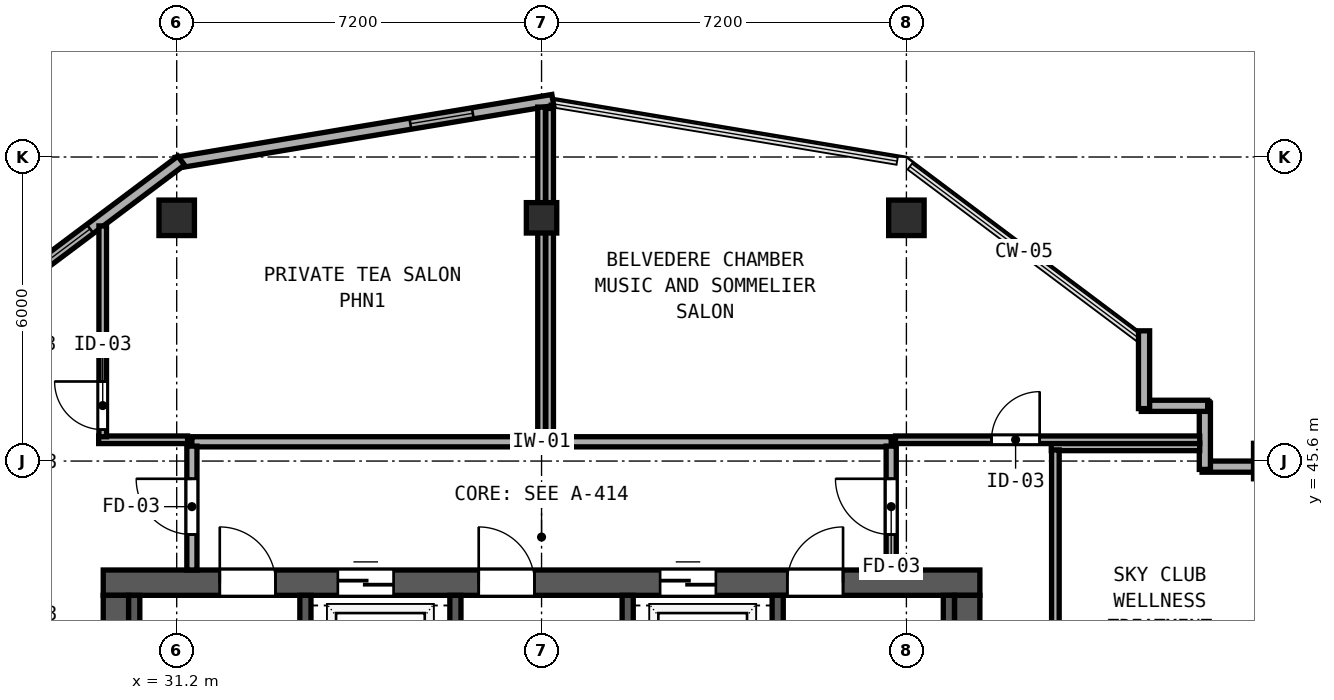
"""IFC4 building model, lengths in metres.
Left out: names, types, materials, properties, quantities, classifications, styles, units other than length and angle.
Written with IfcOpenShell. Run it as: python <this file> out.ifc"""

import sys

from ifc_helpers import new_model, si_unit, direction, frame, frame_2d, origin, origin_2d, place, context, subcontext, project, spatial, rectangle, hollow_rectangle, extrude, element, fill, save


model = new_model("IFC4")
c1 = context("Model", 3, precision=1e-05, world=origin(), true_north=direction((0.0, 1.0)))
c2 = subcontext(c1, "Body", "Model", "MODEL_VIEW")
j1 = project(units=[si_unit("LENGTHUNIT", "METRE"), si_unit("PLANEANGLEUNIT", "RADIAN")], contexts=[c1])
p1 = place(None, origin())
s1 = spatial("IfcSite", under=j1, at=p1, CompositionType="ELEMENT")
p2 = place(p1, origin())
s2 = spatial("IfcBuilding", under=s1, at=p2, CompositionType="ELEMENT")
p3 = place(p2, frame((0.0, 0.0, 305.6)))
s3 = spatial("IfcBuildingStorey", under=s2, at=p3, CompositionType="ELEMENT", Elevation=305.6)
p4 = place(p3, frame((29.75, 43.2, 0.0), z_axis=(0.0, 0.0, 1.0), x_axis=(1.0, 0.0, 0.0)))
e1 = element("IfcWall", 1, at=p4, inside=s3, PredefinedType="SHEAR", context=c2, shape_type="SweptSolid", body=[
    extrude(rectangle(XDim=17.3, YDim=0.5, at=frame_2d((8.65, 0.0))), origin(), (0.0, 0.0, 1.0), 3.72),
])
p5 = place(p4, frame((2.3, 0.0, 0.0)))
e2 = element("IfcOpeningElement", 2, at=p5, cuts=e1, PredefinedType="OPENING", context=c2, shape_type="SweptSolid", body=[
    extrude(rectangle(XDim=1.1, YDim=2.15, at=frame_2d((0.55, 1.075))), frame((0.0, 0.26, 0.0), z_axis=(0.0, -1.0, 0.0), x_axis=(1.0, 0.0, 0.0)), (0.0, 0.0, 1.0), 0.52),
])
p6 = place(p4, frame((7.41, 0.0, 0.0)))
e3 = element("IfcOpeningElement", 3, at=p6, cuts=e1, PredefinedType="OPENING", context=c2, shape_type="SweptSolid", body=[
    extrude(rectangle(XDim=1.1, YDim=2.15, at=frame_2d((0.55, 1.075))), frame((0.0, 0.26, 0.0), z_axis=(0.0, -1.0, 0.0), x_axis=(1.0, 0.0, 0.0)), (0.0, 0.0, 1.0), 0.52),
])
p7 = place(p4, frame((13.5, 0.0, 0.0)))
e4 = element("IfcOpeningElement", 4, at=p7, cuts=e1, PredefinedType="OPENING", context=c2, shape_type="SweptSolid", body=[
    extrude(rectangle(XDim=1.1, YDim=2.15, at=frame_2d((0.55, 1.075))), frame((0.0, 0.26, 0.0), z_axis=(0.0, -1.0, 0.0), x_axis=(1.0, 0.0, 0.0)), (0.0, 0.0, 1.0), 0.52),
])
p8 = place(p4, frame((4.63, 0.0, 0.0)))
e5 = element("IfcOpeningElement", 5, at=p8, cuts=e1, PredefinedType="OPENING", context=c2, shape_type="SweptSolid", body=[
    extrude(rectangle(XDim=1.1, YDim=2.2, at=frame_2d((0.55, 1.1))), frame((0.0, 0.26, 0.0), z_axis=(0.0, -1.0, 0.0), x_axis=(1.0, 0.0, 0.0)), (0.0, 0.0, 1.0), 0.52),
])
p9 = place(p4, frame((10.99, 0.0, 0.0)))
e6 = element("IfcOpeningElement", 6, at=p9, cuts=e1, PredefinedType="OPENING", context=c2, shape_type="SweptSolid", body=[
    extrude(rectangle(XDim=1.1, YDim=2.2, at=frame_2d((0.55, 1.1))), frame((0.0, 0.26, 0.0), z_axis=(0.0, -1.0, 0.0), x_axis=(1.0, 0.0, 0.0)), (0.0, 0.0, 1.0), 0.52),
])
for number, where, z_axis, x_axis in (
    (7, (30.0, 32.8, 0.0), (0.0, 0.0, 1.0), (0.0, 1.0, 0.0)),
    (8, (46.8, 32.8, 0.0), (0.0, 0.0, 1.0), (0.0, 1.0, 0.0)),
):
    element("IfcWall", number, at=place(p3, frame(where, z_axis=z_axis, x_axis=x_axis)), inside=s3, PredefinedType="SHEAR", context=c2, shape_type="SweptSolid", body=[
        extrude(rectangle(XDim=10.15, YDim=0.5, at=frame_2d((5.075, 0.0))), origin(), (0.0, 0.0, 1.0), 3.72),
    ])
for number, where, z_axis, x_axis in (
    (9, (30.362, 35.39, 0.0), (0.0, 0.0, 1.0), (0.0, 1.0, 0.0)),
    (10, (33.74, 35.39, 0.0), (0.0, 0.0, 1.0), (0.0, 1.0, 0.0)),
    (11, (36.7, 35.39, 0.0), (0.0, 0.0, 1.0), (0.0, 1.0, 0.0)),
    (12, (40.1, 35.39, 0.0), (0.0, 0.0, 1.0), (0.0, 1.0, 0.0)),
    (13, (43.06, 35.39, 0.0), (0.0, 0.0, 1.0), (0.0, 1.0, 0.0)),
    (14, (46.438, 35.39, 0.0), (0.0, 0.0, 1.0), (0.0, 1.0, 0.0)),
):
    element("IfcWall", number, at=place(p3, frame(where, z_axis=z_axis, x_axis=x_axis)), inside=s3, PredefinedType="SHEAR", context=c2, shape_type="SweptSolid", body=[
        extrude(rectangle(XDim=7.56, YDim=0.22, at=frame_2d((3.78, 0.0))), origin(), (0.0, 0.0, 1.0), 3.72),
    ])
for number, where, z_axis, x_axis in (
    (15, (52.8, 45.6, 0.0), (0.0, 0.0, 1.0), (1.0, 0.0, 0.0)),
    (16, (31.2, 50.4, 0.0), (0.0, 0.0, 1.0), (1.0, 0.0, 0.0)),
    (17, (45.6, 50.4, 0.0), (0.0, 0.0, 1.0), (1.0, 0.0, 0.0)),
):
    element("IfcColumn", number, at=place(p3, frame(where, z_axis=z_axis, x_axis=x_axis)), inside=s3, PredefinedType="COLUMN", context=c2, shape_type="SweptSolid", body=[
        extrude(hollow_rectangle(XDim=0.7, YDim=0.7, WallThickness=0.026, at=origin_2d()), origin(), (0.0, 0.0, 1.0), 3.9),
    ])
p10 = place(p3, frame((38.4, 50.4, 0.0), z_axis=(0.0, 0.0, 1.0), x_axis=(1.0, 0.0, 0.0)))
e18 = element("IfcColumn", 18, at=p10, inside=s3, PredefinedType="COLUMN", context=c2, shape_type="SweptSolid", body=[
    extrude(hollow_rectangle(XDim=0.6, YDim=0.6, WallThickness=0.024, at=origin_2d()), origin(), (0.0, 0.0, 1.0), 3.9),
])
p11 = place(p3, frame((52.458, 45.49, 0.0), z_axis=(0.0, 0.0, 1.0), x_axis=(-1.0, 0.0, 0.0)))
e19 = element("IfcWall", 19, at=p11, inside=s3, PredefinedType="SOLIDWALL", context=c2, shape_type="SweptSolid", body=[
    extrude(rectangle(XDim=1.023, YDim=0.22, at=frame_2d((0.511, 0.0))), origin(), (0.0, 0.0, 1.0), 3.72),
])
p12 = place(p3, frame((51.49, 45.435, 0.0), z_axis=(0.0, 0.0, 1.0), x_axis=(0.0, 1.0, 0.0)))
e20 = element("IfcWall", 20, at=p12, inside=s3, PredefinedType="SOLIDWALL", context=c2, shape_type="SweptSolid", body=[
    extrude(rectangle(XDim=1.31, YDim=0.22, at=frame_2d((0.655, 0.0))), origin(), (0.0, 0.0, 1.0), 3.72),
])
p13 = place(p3, frame((51.545, 46.69, 0.0), z_axis=(0.0, 0.0, 1.0), x_axis=(-1.0, 0.0, 0.0)))
e21 = element("IfcWall", 21, at=p13, inside=s3, PredefinedType="SOLIDWALL", context=c2, shape_type="SweptSolid", body=[
    extrude(rectangle(XDim=1.31, YDim=0.22, at=frame_2d((0.655, 0.0))), origin(), (0.0, 0.0, 1.0), 3.72),
])
p14 = place(p3, frame((50.29, 46.635, 0.0), z_axis=(0.0, 0.0, 1.0), x_axis=(0.0, 1.0, 0.0)))
e22 = element("IfcWall", 22, at=p14, inside=s3, PredefinedType="SOLIDWALL", context=c2, shape_type="SweptSolid", body=[
    extrude(rectangle(XDim=1.535, YDim=0.22, at=frame_2d((0.768, 0.0))), origin(), (0.0, 0.0, 1.0), 3.72),
])
p15 = place(p3, frame((38.622, 52.726, 0.0), z_axis=(0.0, 0.0, 1.0), x_axis=(-0.986390420428, -0.164420006349, 0.0)))
e23 = element("IfcWall", 23, at=p15, inside=s3, PredefinedType="SOLIDWALL", context=c2, shape_type="SweptSolid", body=[
    extrude(rectangle(XDim=7.534, YDim=0.22, at=frame_2d((3.767, 0.0))), origin(), (0.0, 0.0, 1.0), 3.72),
])
p16 = place(p15, frame((1.6, 0.0, 0.85)))
e24 = element("IfcOpeningElement", 24, at=p16, cuts=e23, PredefinedType="OPENING", context=c2, shape_type="SweptSolid", body=[
    extrude(rectangle(XDim=1.25, YDim=1.95, at=frame_2d((0.625, 0.975))), frame((0.0, 0.12, 0.0), z_axis=(0.0, -1.0, 0.0), x_axis=(1.0, 0.0, 0.0)), (0.0, 0.0, 1.0), 0.24),
])
p17 = place(p3, frame((31.289, 51.529, 0.0), z_axis=(0.0, 0.0, 1.0), x_axis=(-0.800014580093, -0.599980559383, 0.0)))
e25 = element("IfcWall", 25, at=p17, inside=s3, PredefinedType="SOLIDWALL", context=c2, shape_type="SweptSolid", body=[
    extrude(rectangle(XDim=6.028, YDim=0.22, at=frame_2d((3.014, 0.0))), origin(), (0.0, 0.0, 1.0), 3.72),
])
p18 = place(p17, frame((2.247, 0.0, 0.85)))
e26 = element("IfcOpeningElement", 26, at=p18, cuts=e25, PredefinedType="OPENING", context=c2, shape_type="SweptSolid", body=[
    extrude(rectangle(XDim=1.25, YDim=1.95, at=frame_2d((0.625, 0.975))), frame((0.0, 0.12, 0.0), z_axis=(0.0, -1.0, 0.0), x_axis=(1.0, 0.0, 0.0)), (0.0, 0.0, 1.0), 0.24),
])
p19 = place(p3, frame((31.5, 45.98, 0.0), z_axis=(0.0, 0.0, 1.0), x_axis=(1.0, 0.0, 0.0)))
e27 = element("IfcWall", 27, at=p19, inside=s3, PredefinedType="SOLIDWALL", context=c2, shape_type="SweptSolid", body=[
    extrude(rectangle(XDim=13.8, YDim=0.2, at=frame_2d((6.9, 0.0))), origin(), (0.0, 0.0, 1.0), 3.72),
])
p20 = place(p3, frame((31.5, 43.45, 0.0), z_axis=(0.0, 0.0, 1.0), x_axis=(0.0, 1.0, 0.0)))
e28 = element("IfcWall", 28, at=p20, inside=s3, PredefinedType="SOLIDWALL", context=c2, shape_type="SweptSolid", body=[
    extrude(rectangle(XDim=2.445, YDim=0.2, at=frame_2d((1.223, 0.0))), origin(), (0.0, 0.0, 1.0), 3.72),
])
p21 = place(p20, frame((1.8, 0.0, 0.0), z_axis=(0.0, 0.0, 1.0), x_axis=(-1.0, 0.0, 0.0)))
e29 = element("IfcOpeningElement", 29, at=p21, cuts=e28, PredefinedType="OPENING", context=c2, shape_type="SweptSolid", body=[
    extrude(rectangle(XDim=1.1, YDim=2.15, at=frame_2d((0.55, 1.075))), frame((0.0, 0.11, 0.0), z_axis=(0.0, -1.0, 0.0), x_axis=(1.0, 0.0, 0.0)), (0.0, 0.0, 1.0), 0.22),
])
p22 = place(p3, frame((45.3, 43.45, 0.0), z_axis=(0.0, 0.0, 1.0), x_axis=(0.0, 1.0, 0.0)))
e30 = element("IfcWall", 30, at=p22, inside=s3, PredefinedType="SOLIDWALL", context=c2, shape_type="SweptSolid", body=[
    extrude(rectangle(XDim=2.445, YDim=0.2, at=frame_2d((1.223, 0.0))), origin(), (0.0, 0.0, 1.0), 3.72),
])
p23 = place(p22, frame((0.7, 0.0, 0.0)))
e31 = element("IfcOpeningElement", 31, at=p23, cuts=e30, PredefinedType="OPENING", context=c2, shape_type="SweptSolid", body=[
    extrude(rectangle(XDim=1.1, YDim=2.15, at=frame_2d((0.55, 1.075))), frame((0.0, 0.11, 0.0), z_axis=(0.0, -1.0, 0.0), x_axis=(1.0, 0.0, 0.0)), (0.0, 0.0, 1.0), 0.22),
])
p24 = place(p3, frame((48.46, 45.88, 0.0), z_axis=(0.0, 0.0, 1.0), x_axis=(1.0, 0.0, 0.0)))
e32 = element("IfcWall", 32, at=p24, inside=s3, PredefinedType="PARTITIONING", context=c2, shape_type="SweptSolid", body=[
    extrude(rectangle(XDim=2.928, YDim=0.15, at=frame_2d((1.464, 0.0))), origin(), (0.0, 0.0, 1.0), 3.72),
])
p25 = place(p3, frame((48.54, 37.42, 0.0), z_axis=(0.0, 0.0, 1.0), x_axis=(0.0, 1.0, 0.0)))
e33 = element("IfcWall", 33, at=p25, inside=s3, PredefinedType="PARTITIONING", context=c2, shape_type="SweptSolid", body=[
    extrude(rectangle(XDim=8.4, YDim=0.15, at=frame_2d((4.2, 0.0))), origin(), (0.0, 0.0, 1.0), 3.72),
])
p26 = place(p25, frame((2.06, 0.0, 0.0)))
e34 = element("IfcOpeningElement", 34, at=p26, cuts=e33, PredefinedType="OPENING", context=c2, shape_type="SweptSolid", body=[
    extrude(rectangle(XDim=0.95, YDim=2.12, at=frame_2d((0.475, 1.06))), frame((0.0, 0.085, 0.0), z_axis=(0.0, -1.0, 0.0), x_axis=(1.0, 0.0, 0.0)), (0.0, 0.0, 1.0), 0.17),
])
p27 = place(p3, frame((29.66, 46.02, 0.0), z_axis=(0.0, 0.0, 1.0), x_axis=(1.0, 0.0, 0.0)))
e35 = element("IfcWall", 35, at=p27, inside=s3, PredefinedType="PARTITIONING", context=c2, shape_type="SweptSolid", body=[
    extrude(rectangle(XDim=1.755, YDim=0.15, at=frame_2d((0.877, 0.0))), origin(), (0.0, 0.0, 1.0), 3.72),
])
p28 = place(p3, frame((29.74, 46.08, 0.0), z_axis=(0.0, 0.0, 1.0), x_axis=(0.0, 1.0, 0.0)))
e36 = element("IfcWall", 36, at=p28, inside=s3, PredefinedType="PARTITIONING", context=c2, shape_type="SweptSolid", body=[
    extrude(rectangle(XDim=4.16, YDim=0.15, at=frame_2d((2.08, 0.0))), origin(), (0.0, 0.0, 1.0), 3.72),
])
p29 = place(p28, frame((0.14, 0.0, 0.0)))
e37 = element("IfcOpeningElement", 37, at=p29, cuts=e36, PredefinedType="OPENING", context=c2, shape_type="SweptSolid", body=[
    extrude(rectangle(XDim=0.95, YDim=2.12, at=frame_2d((0.475, 1.06))), frame((0.0, 0.085, 0.0), z_axis=(0.0, -1.0, 0.0), x_axis=(1.0, 0.0, 0.0)), (0.0, 0.0, 1.0), 0.17),
])
p30 = place(p3, frame((38.4, 46.065, 0.0), z_axis=(0.0, 0.0, 1.0), x_axis=(0.0, 1.0, 0.0)))
e38 = element("IfcWall", 38, at=p30, inside=s3, PredefinedType="PARTITIONING", context=c2, shape_type="SweptSolid", body=[
    extrude(rectangle(XDim=6.52, YDim=0.15, at=frame_2d((3.26, 0.0))), origin(), (0.0, 0.0, 1.0), 3.72),
])
p31 = place(p3, frame((45.385, 46.02, 0.0), z_axis=(0.0, 0.0, 1.0), x_axis=(1.0, 0.0, 0.0)))
e39 = element("IfcWall", 39, at=p31, inside=s3, PredefinedType="PARTITIONING", context=c2, shape_type="SweptSolid", body=[
    extrude(rectangle(XDim=6.003, YDim=0.15, at=frame_2d((3.001, 0.0))), origin(), (0.0, 0.0, 1.0), 3.72),
])
p32 = place(p31, frame((1.895, 0.0, 0.0)))
e40 = element("IfcOpeningElement", 40, at=p32, cuts=e39, PredefinedType="OPENING", context=c2, shape_type="SweptSolid", body=[
    extrude(rectangle(XDim=0.95, YDim=2.12, at=frame_2d((0.475, 1.06))), frame((0.0, 0.085, 0.0), z_axis=(0.0, -1.0, 0.0), x_axis=(1.0, 0.0, 0.0)), (0.0, 0.0, 1.0), 0.17),
])
p33 = place(p3, frame((38.56, 46.065, 0.0), z_axis=(0.0, 0.0, 1.0), x_axis=(0.0, 1.0, 0.0)))
e41 = element("IfcWall", 41, at=p33, inside=s3, PredefinedType="PARTITIONING", context=c2, shape_type="SweptSolid", body=[
    extrude(rectangle(XDim=6.493, YDim=0.15, at=frame_2d((3.247, 0.0))), origin(), (0.0, 0.0, 1.0), 3.72),
])
p34 = place(p16, origin())
e42 = element("IfcWindow", 42, at=p34, inside=s3, PartitioningType="SINGLE_PANEL", PredefinedType="WINDOW", context=c2, shape_type="SweptSolid", body=[
    extrude(rectangle(XDim=1.25, YDim=1.95, at=frame_2d((0.625, 0.975))), frame((0.0, 0.03, 0.0), z_axis=(0.0, -1.0, 0.0), x_axis=(1.0, 0.0, 0.0)), (0.0, 0.0, 1.0), 0.06),
])
fill(e24, e42)
p35 = place(p18, origin())
e43 = element("IfcWindow", 43, at=p35, inside=s3, PartitioningType="SINGLE_PANEL", PredefinedType="WINDOW", context=c2, shape_type="SweptSolid", body=[
    extrude(rectangle(XDim=1.25, YDim=1.95, at=frame_2d((0.625, 0.975))), frame((0.0, 0.03, 0.0), z_axis=(0.0, -1.0, 0.0), x_axis=(1.0, 0.0, 0.0)), (0.0, 0.0, 1.0), 0.06),
])
fill(e26, e43)
p36 = place(p5, origin())
e44 = element("IfcDoor", 44, at=p36, inside=s3, OperationType="SINGLE_SWING_LEFT", PredefinedType="DOOR", context=c2, shape_type="SweptSolid", body=[
    extrude(rectangle(XDim=1.1, YDim=2.15, at=frame_2d((0.55, 1.075))), frame((0.0, 0.185, 0.0), z_axis=(0.0, -1.0, 0.0), x_axis=(1.0, 0.0, 0.0)), (0.0, 0.0, 1.0), 0.05),
])
fill(e2, e44)
p37 = place(p6, origin())
e45 = element("IfcDoor", 45, at=p37, inside=s3, OperationType="SINGLE_SWING_LEFT", PredefinedType="DOOR", context=c2, shape_type="SweptSolid", body=[
    extrude(rectangle(XDim=1.1, YDim=2.15, at=frame_2d((0.55, 1.075))), frame((0.0, 0.185, 0.0), z_axis=(0.0, -1.0, 0.0), x_axis=(1.0, 0.0, 0.0)), (0.0, 0.0, 1.0), 0.05),
])
fill(e3, e45)
p38 = place(p7, origin())
e46 = element("IfcDoor", 46, at=p38, inside=s3, OperationType="SINGLE_SWING_RIGHT", PredefinedType="DOOR", context=c2, shape_type="SweptSolid", body=[
    extrude(rectangle(XDim=1.1, YDim=2.15, at=frame_2d((0.55, 1.075))), frame((0.0, 0.185, 0.0), z_axis=(0.0, -1.0, 0.0), x_axis=(1.0, 0.0, 0.0)), (0.0, 0.0, 1.0), 0.05),
])
fill(e4, e46)
p39 = place(p21, origin())
e47 = element("IfcDoor", 47, at=p39, inside=s3, OperationType="SINGLE_SWING_LEFT", PredefinedType="DOOR", context=c2, shape_type="SweptSolid", body=[
    extrude(rectangle(XDim=1.1, YDim=2.15, at=frame_2d((0.55, 1.075))), frame((0.0, 0.025, 0.0), z_axis=(0.0, -1.0, 0.0), x_axis=(1.0, 0.0, 0.0)), (0.0, 0.0, 1.0), 0.05),
])
fill(e29, e47)
p40 = place(p23, origin())
e48 = element("IfcDoor", 48, at=p40, inside=s3, OperationType="SINGLE_SWING_RIGHT", PredefinedType="DOOR", context=c2, shape_type="SweptSolid", body=[
    extrude(rectangle(XDim=1.1, YDim=2.15, at=frame_2d((0.55, 1.075))), frame((0.0, 0.025, 0.0), z_axis=(0.0, -1.0, 0.0), x_axis=(1.0, 0.0, 0.0)), (0.0, 0.0, 1.0), 0.05),
])
fill(e31, e48)
p41 = place(p8, origin())
e49 = element("IfcDoor", 49, at=p41, inside=s3, OperationType="SLIDING_TO_LEFT", PredefinedType="DOOR", context=c2, shape_type="SweptSolid", body=[
    extrude(rectangle(XDim=1.1, YDim=2.2, at=frame_2d((0.55, 1.1))), frame((0.0, 0.185, 0.0), z_axis=(0.0, -1.0, 0.0), x_axis=(1.0, 0.0, 0.0)), (0.0, 0.0, 1.0), 0.05),
])
fill(e5, e49)
p42 = place(p9, origin())
e50 = element("IfcDoor", 50, at=p42, inside=s3, OperationType="SLIDING_TO_LEFT", PredefinedType="DOOR", context=c2, shape_type="SweptSolid", body=[
    extrude(rectangle(XDim=1.1, YDim=2.2, at=frame_2d((0.55, 1.1))), frame((0.0, 0.185, 0.0), z_axis=(0.0, -1.0, 0.0), x_axis=(1.0, 0.0, 0.0)), (0.0, 0.0, 1.0), 0.05),
])
fill(e6, e50)
p43 = place(p29, origin())
e51 = element("IfcDoor", 51, at=p43, inside=s3, OperationType="SINGLE_SWING_RIGHT", PredefinedType="DOOR", context=c2, shape_type="SweptSolid", body=[
    extrude(rectangle(XDim=0.95, YDim=2.12, at=frame_2d((0.475, 1.06))), frame((0.0, 0.025, 0.0), z_axis=(0.0, -1.0, 0.0), x_axis=(1.0, 0.0, 0.0)), (0.0, 0.0, 1.0), 0.05),
])
fill(e37, e51)
p44 = place(p32, origin())
e52 = element("IfcDoor", 52, at=p44, inside=s3, OperationType="SINGLE_SWING_RIGHT", PredefinedType="DOOR", context=c2, shape_type="SweptSolid", body=[
    extrude(rectangle(XDim=0.95, YDim=2.12, at=frame_2d((0.475, 1.06))), frame((0.0, 0.025, 0.0), z_axis=(0.0, -1.0, 0.0), x_axis=(1.0, 0.0, 0.0)), (0.0, 0.0, 1.0), 0.05),
])
fill(e40, e52)
save(model, sys.argv[1])
